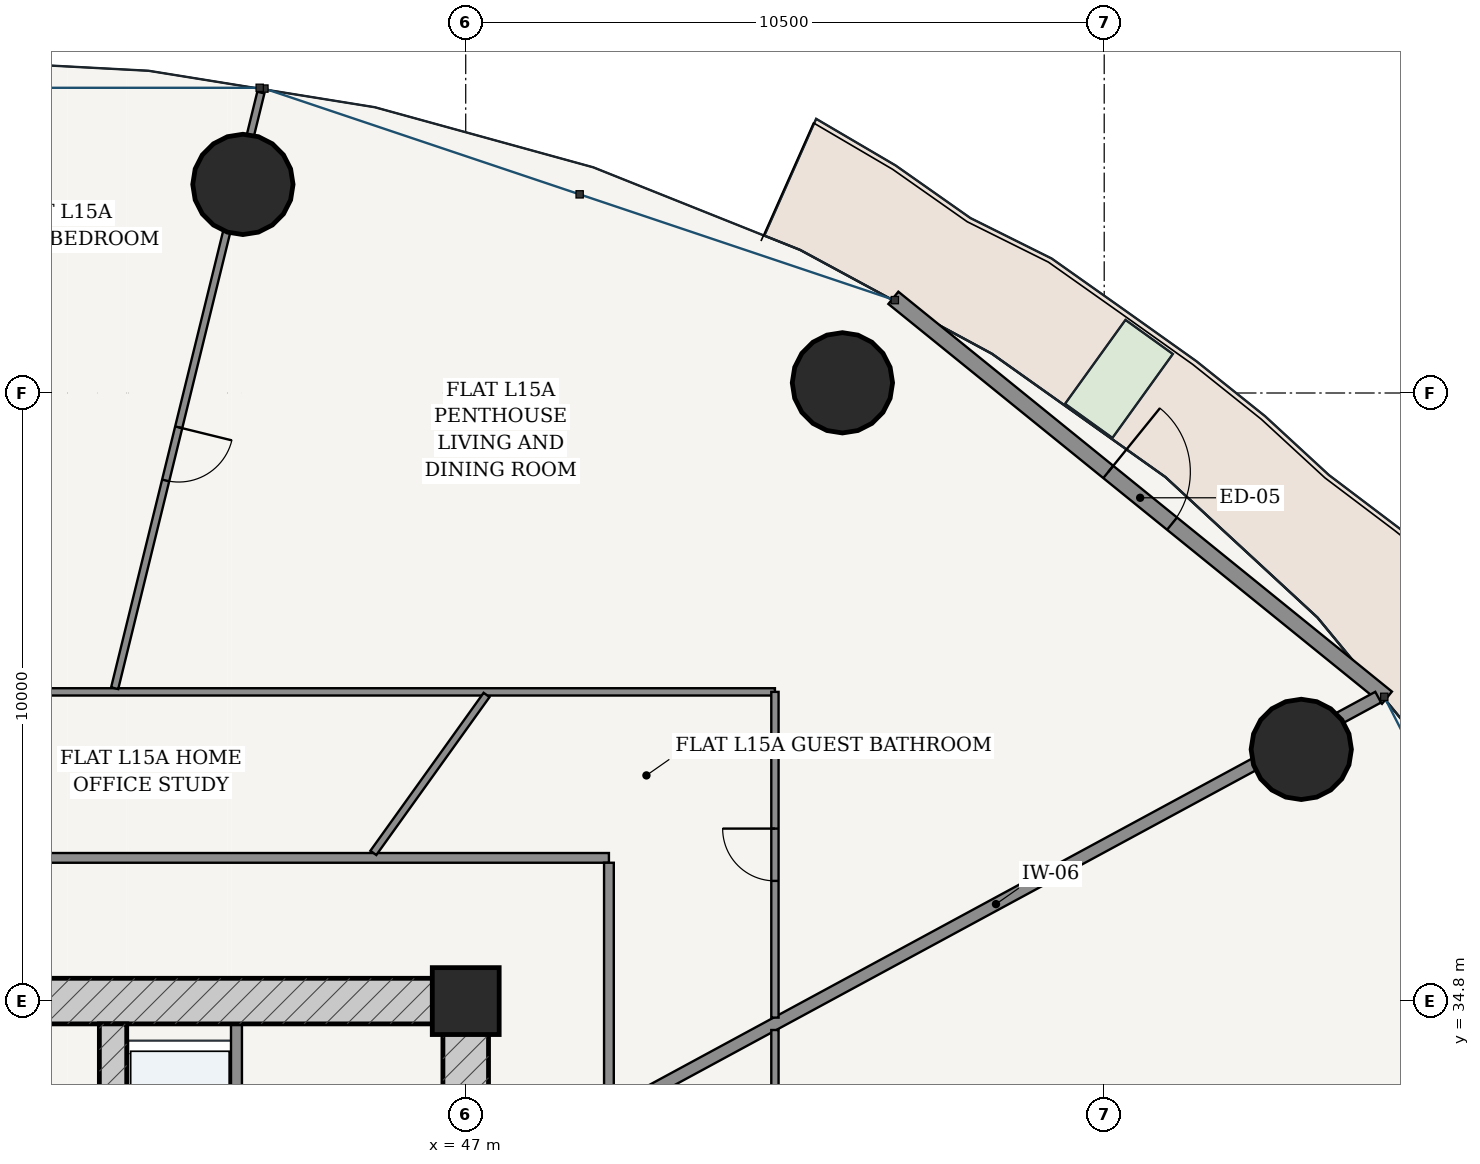
"""IFC4 building model, lengths in metres.
Left out: names, types, materials, properties, quantities, classifications, styles, units other than length and angle.
Written with IfcOpenShell. Run it as: python <this file> out.ifc"""

import sys

from ifc_helpers import new_model, si_unit, direction, frame, frame_2d, origin, origin_2d, place, context, subcontext, project, spatial, rectangle, hollow_circle, extrude, source, transform, mapped, element, fill, save


model = new_model("IFC4")
c1 = context("Model", 3, precision=1e-05, world=origin(), true_north=direction((-0.2419218956, 0.970295726276)))
c2 = subcontext(c1, "Body", "Model", "MODEL_VIEW")
j1 = project(units=[si_unit("LENGTHUNIT", "METRE"), si_unit("PLANEANGLEUNIT", "RADIAN")], contexts=[c1])
p1 = place(None, origin())
s1 = spatial("IfcSite", under=j1, at=p1, CompositionType="ELEMENT")
p2 = place(p1, origin())
s2 = spatial("IfcBuilding", under=s1, at=p2, CompositionType="ELEMENT")
p3 = place(p2, frame((0.0, 0.0, 60.0)))
s3 = spatial("IfcBuildingStorey", under=s2, at=p3, CompositionType="ELEMENT", Elevation=60.0)
p4 = place(p3, frame((47.0, 34.8, 0.0), z_axis=(0.0, 0.0, 1.0), x_axis=(1.0, 0.0, 0.0)))
e1 = element("IfcColumn", 1, at=p4, inside=s3, PredefinedType="COLUMN", context=c2, shape_type="SweptSolid", body=[
    extrude(rectangle(XDim=1.1, YDim=1.1, at=origin_2d()), origin(), (0.0, 0.0, 1.0), 3.6),
])
p5 = place(p3, frame((28.625, 34.8, 0.0), z_axis=(0.0, 0.0, 1.0), x_axis=(1.0, 0.0, 0.0)))
e2 = element("IfcWall", 2, at=p5, inside=s3, PredefinedType="SHEAR", context=c2, shape_type="SweptSolid", body=[
    extrude(rectangle(XDim=18.75, YDim=0.75, at=frame_2d((9.375, 0.0))), origin(), (0.0, 0.0, 1.0), 3.32),
])
p6 = place(p5, frame((8.95, 0.0, 0.0)))
e3 = element("IfcOpeningElement", 3, at=p6, cuts=e2, PredefinedType="OPENING", context=c2, shape_type="SweptSolid", body=[
    extrude(rectangle(XDim=0.85, YDim=2.1, at=frame_2d((0.425, 1.05))), frame((0.0, 0.385, 0.0), z_axis=(0.0, -1.0, 0.0), x_axis=(1.0, 0.0, 0.0)), (0.0, 0.0, 1.0), 0.77),
])
p7 = place(p3, frame((47.0, 19.175, 0.0), z_axis=(0.0, 0.0, 1.0), x_axis=(0.0, 1.0, 0.0)))
e4 = element("IfcWall", 4, at=p7, inside=s3, PredefinedType="SHEAR", context=c2, shape_type="SweptSolid", body=[
    extrude(rectangle(XDim=15.25, YDim=0.75, at=frame_2d((7.625, 0.0))), origin(), (0.0, 0.0, 1.0), 3.32),
])
p8 = place(p7, frame((9.875, 0.0, 0.0)))
e5 = element("IfcOpeningElement", 5, at=p8, cuts=e4, PredefinedType="OPENING", context=c2, shape_type="SweptSolid", body=[
    extrude(rectangle(XDim=1.5, YDim=2.2, at=frame_2d((0.75, 1.1))), frame((0.0, 0.385, 0.0), z_axis=(0.0, -1.0, 0.0), x_axis=(1.0, 0.0, 0.0)), (0.0, 0.0, 1.0), 0.77),
])
p9 = place(p3, frame((41.2, 19.175, 0.0), z_axis=(0.0, 0.0, 1.0), x_axis=(0.0, 1.0, 0.0)))
e6 = element("IfcWall", 6, at=p9, inside=s3, PredefinedType="SHEAR", context=c2, shape_type="SweptSolid", body=[
    extrude(rectangle(XDim=15.25, YDim=0.45, at=frame_2d((7.625, 0.0))), origin(), (0.0, 0.0, 1.0), 3.32),
])
p10 = place(p9, frame((7.8, 0.0, 0.0)))
e7 = element("IfcOpeningElement", 7, at=p10, cuts=e6, PredefinedType="OPENING", context=c2, shape_type="SweptSolid", body=[
    extrude(rectangle(XDim=1.05, YDim=2.15, at=frame_2d((0.525, 1.075))), frame((0.0, 0.235, 0.0), z_axis=(0.0, -1.0, 0.0), x_axis=(1.0, 0.0, 0.0)), (0.0, 0.0, 1.0), 0.47),
])
for number, where, z_axis, x_axis in (
    (8, (60.741, 38.939, 0.0), (0.0, 0.0, 1.0), (1.0, 0.0, 0.0)),
    (9, (53.195, 44.968, 0.0), (0.0, 0.0, 1.0), (1.0, 0.0, 0.0)),
    (10, (43.336, 48.23, 0.0), (0.0, 0.0, 1.0), (1.0, 0.0, 0.0)),
):
    element("IfcColumn", number, at=place(p3, frame(where, z_axis=z_axis, x_axis=x_axis)), inside=s3, PredefinedType="COLUMN", context=c2, shape_type="SweptSolid", body=[
        extrude(hollow_circle(Radius=0.825, WallThickness=0.05, at=origin_2d()), origin(), (0.0, 0.0, 1.0), 3.6),
    ])
p11 = place(p3, frame((62.15, 39.789, 0.0), z_axis=(0.0, 0.0, 1.0), x_axis=(-0.777005352078, 0.62949398952, 0.0)))
e11 = element("IfcWall", 11, at=p11, inside=s3, PredefinedType="SOLIDWALL", context=c2, shape_type="SweptSolid", body=[
    extrude(rectangle(XDim=10.447, YDim=0.26, at=frame_2d((5.223, 0.0))), origin(), (0.0, 0.0, 1.0), 3.32),
])
p12 = place(p11, frame((4.548, 0.0, 0.0)))
e12 = element("IfcOpeningElement", 12, at=p12, cuts=e11, PredefinedType="OPENING", context=c2, shape_type="SweptSolid", body=[
    extrude(rectangle(XDim=1.35, YDim=2.2, at=frame_2d((0.675, 1.1))), frame((0.0, 0.14, 0.0), z_axis=(0.0, -1.0, 0.0), x_axis=(1.0, 0.0, 0.0)), (0.0, 0.0, 1.0), 0.28),
])
p13 = place(p3, frame((43.23, 28.52, 0.0), z_axis=(0.0, 0.0, 1.0), x_axis=(0.0, 1.0, 0.0)))
e13 = element("IfcWall", 13, at=p13, inside=s3, PredefinedType="PARTITIONING", context=c2, shape_type="SweptSolid", body=[
    extrude(rectangle(XDim=5.905, YDim=0.18, at=frame_2d((2.953, 0.0))), origin(), (0.0, 0.0, 1.0), 3.32),
])
p14 = place(p13, frame((0.905, 0.0, 0.0)))
e14 = element("IfcOpeningElement", 14, at=p14, cuts=e13, PredefinedType="OPENING", context=c2, shape_type="SweptSolid", body=[
    extrude(rectangle(XDim=0.85, YDim=2.1, at=frame_2d((0.425, 1.05))), frame((0.0, 0.1, 0.0), z_axis=(0.0, -1.0, 0.0), x_axis=(1.0, 0.0, 0.0)), (0.0, 0.0, 1.0), 0.2),
])
p15 = place(p13, frame((3.655, 0.0, 0.0)))
e15 = element("IfcOpeningElement", 15, at=p15, cuts=e13, PredefinedType="OPENING", context=c2, shape_type="SweptSolid", body=[
    extrude(rectangle(XDim=1.15, YDim=2.2, at=frame_2d((0.575, 1.1))), frame((0.0, 0.1, 0.0), z_axis=(0.0, -1.0, 0.0), x_axis=(1.0, 0.0, 0.0)), (0.0, 0.0, 1.0), 0.2),
])
p16 = place(p3, frame((26.645, 37.155, 0.0), z_axis=(0.0, 0.0, 1.0), x_axis=(1.0, 0.0, 0.0)))
e16 = element("IfcWall", 16, at=p16, inside=s3, PredefinedType="PARTITIONING", context=c2, shape_type="SweptSolid", body=[
    extrude(rectangle(XDim=22.71, YDim=0.16, at=frame_2d((11.355, 0.0))), origin(), (0.0, 0.0, 1.0), 2.688),
])
p17 = place(p3, frame((49.355, 16.525, 0.0), z_axis=(0.0, 0.0, 1.0), x_axis=(0.0, 1.0, 0.0)))
e17 = element("IfcWall", 17, at=p17, inside=s3, PredefinedType="PARTITIONING", context=c2, shape_type="SweptSolid", body=[
    extrude(rectangle(XDim=20.55, YDim=0.16, at=frame_2d((10.275, 0.0))), origin(), (0.0, 0.0, 1.0), 2.688),
])
p18 = place(p17, frame((2.733, 0.0, 0.0)))
e18 = element("IfcOpeningElement", 18, at=p18, cuts=e17, PredefinedType="OPENING", context=c2, shape_type="SweptSolid", body=[
    extrude(rectangle(XDim=0.98, YDim=2.2, at=frame_2d((0.49, 1.1))), frame((0.0, 0.09, 0.0), z_axis=(0.0, -1.0, 0.0), x_axis=(1.0, 0.0, 0.0)), (0.0, 0.0, 1.0), 0.18),
])
p19 = place(p3, frame((49.435, 32.991, 0.0), z_axis=(0.0, 0.0, 1.0), x_axis=(0.879369737803, 0.476139542819, 0.0)))
e19 = element("IfcWall", 19, at=p19, inside=s3, PredefinedType="PARTITIONING", context=c2, shape_type="SweptSolid", body=[
    extrude(rectangle(XDim=14.295, YDim=0.2, at=frame_2d((7.147, 0.0))), origin(), (0.0, 0.0, 1.0), 2.688),
])
p20 = place(p3, frame((23.915, 39.885, 0.0), z_axis=(0.0, 0.0, 1.0), x_axis=(1.0, 0.0, 0.0)))
e20 = element("IfcWall", 20, at=p20, inside=s3, PredefinedType="PARTITIONING", context=c2, shape_type="SweptSolid", body=[
    extrude(rectangle(XDim=28.17, YDim=0.12, at=frame_2d((14.085, 0.0))), origin(), (0.0, 0.0, 1.0), 2.688),
])
p21 = place(p20, frame((12.891, 0.0, 0.0)))
e21 = element("IfcOpeningElement", 21, at=p21, cuts=e20, PredefinedType="OPENING", context=c2, shape_type="SweptSolid", body=[
    extrude(rectangle(XDim=0.9, YDim=2.15, at=frame_2d((0.45, 1.075))), frame((0.0, 0.07, 0.0), z_axis=(0.0, -1.0, 0.0), x_axis=(1.0, 0.0, 0.0)), (0.0, 0.0, 1.0), 0.14),
])
p22 = place(p3, frame((52.085, 39.885, 0.0), z_axis=(0.0, 0.0, 1.0), x_axis=(0.0, -1.0, 0.0)))
e22 = element("IfcWall", 22, at=p22, inside=s3, PredefinedType="PARTITIONING", context=c2, shape_type="SweptSolid", body=[
    extrude(rectangle(XDim=5.357, YDim=0.12, at=frame_2d((2.678, 0.0))), origin(), (0.0, 0.0, 1.0), 2.999),
])
p23 = place(p22, frame((2.248, 0.0, 0.0)))
e23 = element("IfcOpeningElement", 23, at=p23, cuts=e22, PredefinedType="OPENING", context=c2, shape_type="SweptSolid", body=[
    extrude(rectangle(XDim=0.86, YDim=2.15, at=frame_2d((0.43, 1.075))), frame((0.0, 0.07, 0.0), z_axis=(0.0, -1.0, 0.0), x_axis=(1.0, 0.0, 0.0)), (0.0, 0.0, 1.0), 0.14),
])
p24 = place(p3, frame((41.227, 39.945, 0.0), z_axis=(0.0, 0.0, 1.0), x_axis=(0.238375747469, 0.97117300365, 0.0)))
e24 = element("IfcWall", 24, at=p24, inside=s3, PredefinedType="PARTITIONING", context=c2, shape_type="SweptSolid", body=[
    extrude(rectangle(XDim=10.086, YDim=0.12, at=frame_2d((5.043, 0.0))), origin(), (0.0, 0.0, 1.0), 2.688),
])
p25 = place(p24, frame((3.518, 0.0, 0.0)))
e25 = element("IfcOpeningElement", 25, at=p25, cuts=e24, PredefinedType="OPENING", context=c2, shape_type="SweptSolid", body=[
    extrude(rectangle(XDim=0.9, YDim=2.15, at=frame_2d((0.45, 1.075))), frame((0.0, 0.07, 0.0), z_axis=(0.0, -1.0, 0.0), x_axis=(1.0, 0.0, 0.0)), (0.0, 0.0, 1.0), 0.14),
])
p26 = place(p3, frame((45.481, 37.237, 0.0), z_axis=(0.0, 0.0, 1.0), x_axis=(0.582530715463, 0.812808689387, 0.0)))
e26 = element("IfcWall", 26, at=p26, inside=s3, PredefinedType="PARTITIONING", context=c2, shape_type="SweptSolid", body=[
    extrude(rectangle(XDim=3.197, YDim=0.12, at=frame_2d((1.598, 0.0))), origin(), (0.0, 0.0, 1.0), 3.32),
])
p27 = place(p3, frame((52.085, 34.324, 0.0), z_axis=(0.0, 0.0, 1.0), x_axis=(0.0, -1.0, 0.0)))
e27 = element("IfcWall", 27, at=p27, inside=s3, PredefinedType="PARTITIONING", context=c2, shape_type="SweptSolid", body=[
    extrude(rectangle(XDim=20.609, YDim=0.12, at=frame_2d((10.305, 0.0))), origin(), (0.0, 0.0, 1.0), 2.688),
])
p28 = place(p27, frame((15.972, 0.0, 0.0)))
e28 = element("IfcOpeningElement", 28, at=p28, cuts=e27, PredefinedType="OPENING", context=c2, shape_type="SweptSolid", body=[
    extrude(rectangle(XDim=0.9, YDim=2.15, at=frame_2d((0.45, 1.075))), frame((0.0, 0.07, 0.0), z_axis=(0.0, -1.0, 0.0), x_axis=(1.0, 0.0, 0.0)), (0.0, 0.0, 1.0), 0.14),
])
p29 = place(p27, frame((3.058, 0.0, 0.0)))
e29 = element("IfcOpeningElement", 29, at=p29, cuts=e27, PredefinedType="OPENING", context=c2, shape_type="SweptSolid", body=[
    extrude(rectangle(XDim=0.9, YDim=2.15, at=frame_2d((0.45, 1.075))), frame((0.0, 0.07, 0.0), z_axis=(0.0, -1.0, 0.0), x_axis=(1.0, 0.0, 0.0)), (0.0, 0.0, 1.0), 0.14),
])
m1 = source(origin(), c2, "Body", "SweptSolid", [
    extrude(rectangle(XDim=1.35, YDim=2.2, at=frame_2d((0.675, 1.1))), frame((0.0, 0.025, 0.0), z_axis=(0.0, -1.0, 0.0), x_axis=(1.0, 0.0, 0.0)), (0.0, 0.0, 1.0), 0.05),
])
p30 = place(p12, frame((1.35, 0.0, 0.0), z_axis=(0.0, 0.0, 1.0), x_axis=(-1.0, 0.0, 0.0)))
e30 = element("IfcDoor", 30, at=p30, inside=s3, OperationType="SINGLE_SWING_LEFT", PredefinedType="DOOR", context=c2, shape_type="MappedRepresentation", body=[
    mapped(m1, transform((0.0, 0.0, 0.0), scale=1.0)),
])
fill(e12, e30)
m2 = source(origin(), c2, "Body", "SweptSolid", [
    extrude(rectangle(XDim=0.9, YDim=2.15, at=frame_2d((0.45, 1.075))), frame((0.0, 0.025, 0.0), z_axis=(0.0, -1.0, 0.0), x_axis=(1.0, 0.0, 0.0)), (0.0, 0.0, 1.0), 0.05),
])
p31 = place(p25, frame((0.9, 0.0, 0.0), z_axis=(0.0, 0.0, 1.0), x_axis=(-1.0, 0.0, 0.0)))
e31 = element("IfcDoor", 31, at=p31, inside=s3, OperationType="SINGLE_SWING_LEFT", PredefinedType="DOOR", context=c2, shape_type="MappedRepresentation", body=[
    mapped(m2, transform((0.0, 0.0, 0.0), scale=1.0)),
])
fill(e25, e31)
m3 = source(origin(), c2, "Body", "SweptSolid", [
    extrude(rectangle(XDim=0.86, YDim=2.15, at=frame_2d((0.43, 1.075))), frame((0.0, 0.025, 0.0), z_axis=(0.0, -1.0, 0.0), x_axis=(1.0, 0.0, 0.0)), (0.0, 0.0, 1.0), 0.05),
])
p32 = place(p23, frame((0.86, 0.0, 0.0), z_axis=(0.0, 0.0, 1.0), x_axis=(-1.0, 0.0, 0.0)))
e32 = element("IfcDoor", 32, at=p32, inside=s3, OperationType="SINGLE_SWING_RIGHT", PredefinedType="DOOR", context=c2, shape_type="MappedRepresentation", body=[
    mapped(m3, transform((0.0, 0.0, 0.0), scale=1.0)),
])
fill(e23, e32)
save(model, sys.argv[1])
